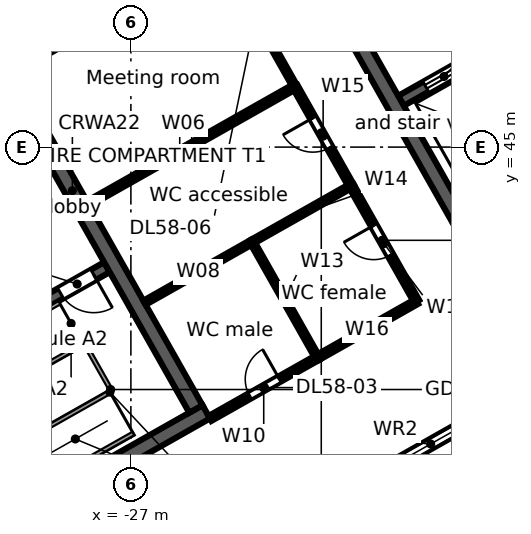
"""IFC4 building model, lengths in metres.
Left out: names, types, materials, properties, quantities, classifications, styles, units other than length and angle.
Written with IfcOpenShell. Run it as: python <this file> out.ifc"""

import sys

from ifc_helpers import new_model, si_unit, direction, frame, frame_2d, origin, place, context, subcontext, project, spatial, rectangle, extrude, element, fill, save


model = new_model("IFC4")
c1 = context("Model", 3, precision=1e-05, world=origin(), true_north=direction((0.0, 1.0)))
c2 = subcontext(c1, "Body", "Model", "MODEL_VIEW")
j1 = project(units=[si_unit("LENGTHUNIT", "METRE"), si_unit("PLANEANGLEUNIT", "RADIAN")], contexts=[c1])
p1 = place(None, origin())
s1 = spatial("IfcSite", under=j1, at=p1, CompositionType="ELEMENT")
p2 = place(p1, origin())
s2 = spatial("IfcBuilding", under=s1, at=p2, CompositionType="ELEMENT")
p3 = place(p2, frame((0.0, 0.0, 262.7)))
s3 = spatial("IfcBuildingStorey", under=s2, at=p3, CompositionType="ELEMENT", Elevation=262.7)
p4 = place(p3, frame((-58.732, 38.771, 0.0), z_axis=(0.0, 0.0, 1.0), x_axis=(0.870355615581, 0.492423702137, 0.0)))
e1 = element("IfcWall", 1, at=p4, inside=s3, PredefinedType="STANDARD", context=c2, shape_type="SweptSolid", body=[
    extrude(rectangle(XDim=64.052, YDim=0.25, at=frame_2d((32.026, 0.0))), origin(), (0.0, 0.0, 1.0), 3.52),
])
p5 = place(p4, frame((61.259, 0.0, 0.8)))
e2 = element("IfcOpeningElement", 2, at=p5, cuts=e1, PredefinedType="OPENING", context=c2, shape_type="SweptSolid", body=[
    extrude(rectangle(XDim=2.4, YDim=2.2, at=frame_2d((1.2, 1.1))), frame((0.0, 0.135, 0.0), z_axis=(0.0, -1.0, 0.0), x_axis=(1.0, 0.0, 0.0)), (0.0, 0.0, 1.0), 0.27),
])
p6 = place(p4, frame((58.216, 0.0, 0.8)))
e3 = element("IfcOpeningElement", 3, at=p6, cuts=e1, PredefinedType="OPENING", context=c2, shape_type="SweptSolid", body=[
    extrude(rectangle(XDim=2.4, YDim=2.2, at=frame_2d((1.2, 1.1))), frame((0.0, 0.135, 0.0), z_axis=(0.0, -1.0, 0.0), x_axis=(1.0, 0.0, 0.0)), (0.0, 0.0, 1.0), 0.27),
])
p7 = place(p4, frame((55.173, 0.0, 0.8)))
e4 = element("IfcOpeningElement", 4, at=p7, cuts=e1, PredefinedType="OPENING", context=c2, shape_type="SweptSolid", body=[
    extrude(rectangle(XDim=2.4, YDim=2.2, at=frame_2d((1.2, 1.1))), frame((0.0, 0.135, 0.0), z_axis=(0.0, -1.0, 0.0), x_axis=(1.0, 0.0, 0.0)), (0.0, 0.0, 1.0), 0.27),
])
p8 = place(p4, frame((52.129, 0.0, 0.8)))
e5 = element("IfcOpeningElement", 5, at=p8, cuts=e1, PredefinedType="OPENING", context=c2, shape_type="SweptSolid", body=[
    extrude(rectangle(XDim=2.4, YDim=2.2, at=frame_2d((1.2, 1.1))), frame((0.0, 0.135, 0.0), z_axis=(0.0, -1.0, 0.0), x_axis=(1.0, 0.0, 0.0)), (0.0, 0.0, 1.0), 0.27),
])
p9 = place(p4, frame((49.086, 0.0, 0.8)))
e6 = element("IfcOpeningElement", 6, at=p9, cuts=e1, PredefinedType="OPENING", context=c2, shape_type="SweptSolid", body=[
    extrude(rectangle(XDim=2.4, YDim=2.2, at=frame_2d((1.2, 1.1))), frame((0.0, 0.135, 0.0), z_axis=(0.0, -1.0, 0.0), x_axis=(1.0, 0.0, 0.0)), (0.0, 0.0, 1.0), 0.27),
])
p10 = place(p4, frame((46.043, 0.0, 0.8)))
e7 = element("IfcOpeningElement", 7, at=p10, cuts=e1, PredefinedType="OPENING", context=c2, shape_type="SweptSolid", body=[
    extrude(rectangle(XDim=2.4, YDim=2.2, at=frame_2d((1.2, 1.1))), frame((0.0, 0.135, 0.0), z_axis=(0.0, -1.0, 0.0), x_axis=(1.0, 0.0, 0.0)), (0.0, 0.0, 1.0), 0.27),
])
p11 = place(p4, frame((43.0, 0.0, 0.8)))
e8 = element("IfcOpeningElement", 8, at=p11, cuts=e1, PredefinedType="OPENING", context=c2, shape_type="SweptSolid", body=[
    extrude(rectangle(XDim=2.4, YDim=2.2, at=frame_2d((1.2, 1.1))), frame((0.0, 0.135, 0.0), z_axis=(0.0, -1.0, 0.0), x_axis=(1.0, 0.0, 0.0)), (0.0, 0.0, 1.0), 0.27),
])
p12 = place(p4, frame((39.956, 0.0, 0.8)))
e9 = element("IfcOpeningElement", 9, at=p12, cuts=e1, PredefinedType="OPENING", context=c2, shape_type="SweptSolid", body=[
    extrude(rectangle(XDim=2.4, YDim=2.2, at=frame_2d((1.2, 1.1))), frame((0.0, 0.135, 0.0), z_axis=(0.0, -1.0, 0.0), x_axis=(1.0, 0.0, 0.0)), (0.0, 0.0, 1.0), 0.27),
])
p13 = place(p4, frame((36.913, 0.0, 0.8)))
e10 = element("IfcOpeningElement", 10, at=p13, cuts=e1, PredefinedType="OPENING", context=c2, shape_type="SweptSolid", body=[
    extrude(rectangle(XDim=2.4, YDim=2.2, at=frame_2d((1.2, 1.1))), frame((0.0, 0.135, 0.0), z_axis=(0.0, -1.0, 0.0), x_axis=(1.0, 0.0, 0.0)), (0.0, 0.0, 1.0), 0.27),
])
p14 = place(p4, frame((33.87, 0.0, 0.8)))
e11 = element("IfcOpeningElement", 11, at=p14, cuts=e1, PredefinedType="OPENING", context=c2, shape_type="SweptSolid", body=[
    extrude(rectangle(XDim=2.4, YDim=2.2, at=frame_2d((1.2, 1.1))), frame((0.0, 0.135, 0.0), z_axis=(0.0, -1.0, 0.0), x_axis=(1.0, 0.0, 0.0)), (0.0, 0.0, 1.0), 0.27),
])
p15 = place(p4, frame((30.826, 0.0, 0.8)))
e12 = element("IfcOpeningElement", 12, at=p15, cuts=e1, PredefinedType="OPENING", context=c2, shape_type="SweptSolid", body=[
    extrude(rectangle(XDim=2.4, YDim=2.2, at=frame_2d((1.2, 1.1))), frame((0.0, 0.135, 0.0), z_axis=(0.0, -1.0, 0.0), x_axis=(1.0, 0.0, 0.0)), (0.0, 0.0, 1.0), 0.27),
])
p16 = place(p4, frame((27.783, 0.0, 0.8)))
e13 = element("IfcOpeningElement", 13, at=p16, cuts=e1, PredefinedType="OPENING", context=c2, shape_type="SweptSolid", body=[
    extrude(rectangle(XDim=2.4, YDim=2.2, at=frame_2d((1.2, 1.1))), frame((0.0, 0.135, 0.0), z_axis=(0.0, -1.0, 0.0), x_axis=(1.0, 0.0, 0.0)), (0.0, 0.0, 1.0), 0.27),
])
p17 = place(p4, frame((24.74, 0.0, 0.8)))
e14 = element("IfcOpeningElement", 14, at=p17, cuts=e1, PredefinedType="OPENING", context=c2, shape_type="SweptSolid", body=[
    extrude(rectangle(XDim=2.4, YDim=2.2, at=frame_2d((1.2, 1.1))), frame((0.0, 0.135, 0.0), z_axis=(0.0, -1.0, 0.0), x_axis=(1.0, 0.0, 0.0)), (0.0, 0.0, 1.0), 0.27),
])
p18 = place(p4, frame((21.696, 0.0, 0.8)))
e15 = element("IfcOpeningElement", 15, at=p18, cuts=e1, PredefinedType="OPENING", context=c2, shape_type="SweptSolid", body=[
    extrude(rectangle(XDim=2.4, YDim=2.2, at=frame_2d((1.2, 1.1))), frame((0.0, 0.135, 0.0), z_axis=(0.0, -1.0, 0.0), x_axis=(1.0, 0.0, 0.0)), (0.0, 0.0, 1.0), 0.27),
])
p19 = place(p4, frame((18.653, 0.0, 0.8)))
e16 = element("IfcOpeningElement", 16, at=p19, cuts=e1, PredefinedType="OPENING", context=c2, shape_type="SweptSolid", body=[
    extrude(rectangle(XDim=2.4, YDim=2.2, at=frame_2d((1.2, 1.1))), frame((0.0, 0.135, 0.0), z_axis=(0.0, -1.0, 0.0), x_axis=(1.0, 0.0, 0.0)), (0.0, 0.0, 1.0), 0.27),
])
p20 = place(p4, frame((15.61, 0.0, 0.8)))
e17 = element("IfcOpeningElement", 17, at=p20, cuts=e1, PredefinedType="OPENING", context=c2, shape_type="SweptSolid", body=[
    extrude(rectangle(XDim=2.4, YDim=2.2, at=frame_2d((1.2, 1.1))), frame((0.0, 0.135, 0.0), z_axis=(0.0, -1.0, 0.0), x_axis=(1.0, 0.0, 0.0)), (0.0, 0.0, 1.0), 0.27),
])
p21 = place(p4, frame((12.567, 0.0, 0.8)))
e18 = element("IfcOpeningElement", 18, at=p21, cuts=e1, PredefinedType="OPENING", context=c2, shape_type="SweptSolid", body=[
    extrude(rectangle(XDim=2.4, YDim=2.2, at=frame_2d((1.2, 1.1))), frame((0.0, 0.135, 0.0), z_axis=(0.0, -1.0, 0.0), x_axis=(1.0, 0.0, 0.0)), (0.0, 0.0, 1.0), 0.27),
])
p22 = place(p4, frame((9.523, 0.0, 0.8)))
e19 = element("IfcOpeningElement", 19, at=p22, cuts=e1, PredefinedType="OPENING", context=c2, shape_type="SweptSolid", body=[
    extrude(rectangle(XDim=2.4, YDim=2.2, at=frame_2d((1.2, 1.1))), frame((0.0, 0.135, 0.0), z_axis=(0.0, -1.0, 0.0), x_axis=(1.0, 0.0, 0.0)), (0.0, 0.0, 1.0), 0.27),
])
p23 = place(p4, frame((6.48, 0.0, 0.8)))
e20 = element("IfcOpeningElement", 20, at=p23, cuts=e1, PredefinedType="OPENING", context=c2, shape_type="SweptSolid", body=[
    extrude(rectangle(XDim=2.4, YDim=2.2, at=frame_2d((1.2, 1.1))), frame((0.0, 0.135, 0.0), z_axis=(0.0, -1.0, 0.0), x_axis=(1.0, 0.0, 0.0)), (0.0, 0.0, 1.0), 0.27),
])
p24 = place(p4, frame((3.437, 0.0, 0.8)))
e21 = element("IfcOpeningElement", 21, at=p24, cuts=e1, PredefinedType="OPENING", context=c2, shape_type="SweptSolid", body=[
    extrude(rectangle(XDim=2.4, YDim=2.2, at=frame_2d((1.2, 1.1))), frame((0.0, 0.135, 0.0), z_axis=(0.0, -1.0, 0.0), x_axis=(1.0, 0.0, 0.0)), (0.0, 0.0, 1.0), 0.27),
])
p25 = place(p4, frame((0.393, 0.0, 0.8)))
e22 = element("IfcOpeningElement", 22, at=p25, cuts=e1, PredefinedType="OPENING", context=c2, shape_type="SweptSolid", body=[
    extrude(rectangle(XDim=2.4, YDim=2.2, at=frame_2d((1.2, 1.1))), frame((0.0, 0.135, 0.0), z_axis=(0.0, -1.0, 0.0), x_axis=(1.0, 0.0, 0.0)), (0.0, 0.0, 1.0), 0.27),
])
p26 = place(p3, frame((-3.017, 46.293, 0.0), z_axis=(0.0, 0.0, 1.0), x_axis=(-0.870355474887, -0.492423950812, 0.0)))
e23 = element("IfcWall", 23, at=p26, inside=s3, PredefinedType="STANDARD", context=c2, shape_type="SweptSolid", body=[
    extrude(rectangle(XDim=40.34, YDim=0.25, at=frame_2d((20.17, 0.0))), origin(), (0.0, 0.0, 1.0), 3.52),
])
p27 = place(p26, frame((37.428, 0.0, 0.8)))
e24 = element("IfcOpeningElement", 24, at=p27, cuts=e23, PredefinedType="OPENING", context=c2, shape_type="SweptSolid", body=[
    extrude(rectangle(XDim=2.4, YDim=2.2, at=frame_2d((1.2, 1.1))), frame((0.0, 0.135, 0.0), z_axis=(0.0, -1.0, 0.0), x_axis=(1.0, 0.0, 0.0)), (0.0, 0.0, 1.0), 0.27),
])
p28 = place(p26, frame((34.372, 0.0, 0.0)))
e25 = element("IfcOpeningElement", 25, at=p28, cuts=e23, PredefinedType="OPENING", context=c2, shape_type="SweptSolid", body=[
    extrude(rectangle(XDim=1.8, YDim=2.4, at=frame_2d((0.9, 1.2))), frame((0.0, 0.135, 0.0), z_axis=(0.0, -1.0, 0.0), x_axis=(1.0, 0.0, 0.0)), (0.0, 0.0, 1.0), 0.27),
])
p29 = place(p26, frame((30.716, 0.0, 0.8)))
e26 = element("IfcOpeningElement", 26, at=p29, cuts=e23, PredefinedType="OPENING", context=c2, shape_type="SweptSolid", body=[
    extrude(rectangle(XDim=2.4, YDim=2.2, at=frame_2d((1.2, 1.1))), frame((0.0, 0.135, 0.0), z_axis=(0.0, -1.0, 0.0), x_axis=(1.0, 0.0, 0.0)), (0.0, 0.0, 1.0), 0.27),
])
p30 = place(p26, frame((27.36, 0.0, 0.8)))
e27 = element("IfcOpeningElement", 27, at=p30, cuts=e23, PredefinedType="OPENING", context=c2, shape_type="SweptSolid", body=[
    extrude(rectangle(XDim=2.4, YDim=2.2, at=frame_2d((1.2, 1.1))), frame((0.0, 0.135, 0.0), z_axis=(0.0, -1.0, 0.0), x_axis=(1.0, 0.0, 0.0)), (0.0, 0.0, 1.0), 0.27),
])
p31 = place(p26, frame((24.304, 0.0, 0.0)))
e28 = element("IfcOpeningElement", 28, at=p31, cuts=e23, PredefinedType="OPENING", context=c2, shape_type="SweptSolid", body=[
    extrude(rectangle(XDim=1.8, YDim=2.4, at=frame_2d((0.9, 1.2))), frame((0.0, 0.135, 0.0), z_axis=(0.0, -1.0, 0.0), x_axis=(1.0, 0.0, 0.0)), (0.0, 0.0, 1.0), 0.27),
])
p32 = place(p26, frame((20.648, 0.0, 0.8)))
e29 = element("IfcOpeningElement", 29, at=p32, cuts=e23, PredefinedType="OPENING", context=c2, shape_type="SweptSolid", body=[
    extrude(rectangle(XDim=2.4, YDim=2.2, at=frame_2d((1.2, 1.1))), frame((0.0, 0.135, 0.0), z_axis=(0.0, -1.0, 0.0), x_axis=(1.0, 0.0, 0.0)), (0.0, 0.0, 1.0), 0.27),
])
p33 = place(p26, frame((17.292, 0.0, 0.8)))
e30 = element("IfcOpeningElement", 30, at=p33, cuts=e23, PredefinedType="OPENING", context=c2, shape_type="SweptSolid", body=[
    extrude(rectangle(XDim=2.4, YDim=2.2, at=frame_2d((1.2, 1.1))), frame((0.0, 0.135, 0.0), z_axis=(0.0, -1.0, 0.0), x_axis=(1.0, 0.0, 0.0)), (0.0, 0.0, 1.0), 0.27),
])
p34 = place(p26, frame((14.236, 0.0, 0.0)))
e31 = element("IfcOpeningElement", 31, at=p34, cuts=e23, PredefinedType="OPENING", context=c2, shape_type="SweptSolid", body=[
    extrude(rectangle(XDim=1.8, YDim=2.4, at=frame_2d((0.9, 1.2))), frame((0.0, 0.135, 0.0), z_axis=(0.0, -1.0, 0.0), x_axis=(1.0, 0.0, 0.0)), (0.0, 0.0, 1.0), 0.27),
])
p35 = place(p26, frame((10.58, 0.0, 0.8)))
e32 = element("IfcOpeningElement", 32, at=p35, cuts=e23, PredefinedType="OPENING", context=c2, shape_type="SweptSolid", body=[
    extrude(rectangle(XDim=2.4, YDim=2.2, at=frame_2d((1.2, 1.1))), frame((0.0, 0.135, 0.0), z_axis=(0.0, -1.0, 0.0), x_axis=(1.0, 0.0, 0.0)), (0.0, 0.0, 1.0), 0.27),
])
p36 = place(p26, frame((7.224, 0.0, 0.8)))
e33 = element("IfcOpeningElement", 33, at=p36, cuts=e23, PredefinedType="OPENING", context=c2, shape_type="SweptSolid", body=[
    extrude(rectangle(XDim=2.4, YDim=2.2, at=frame_2d((1.2, 1.1))), frame((0.0, 0.135, 0.0), z_axis=(0.0, -1.0, 0.0), x_axis=(1.0, 0.0, 0.0)), (0.0, 0.0, 1.0), 0.27),
])
p37 = place(p26, frame((4.168, 0.0, 0.0)))
e34 = element("IfcOpeningElement", 34, at=p37, cuts=e23, PredefinedType="OPENING", context=c2, shape_type="SweptSolid", body=[
    extrude(rectangle(XDim=1.8, YDim=2.4, at=frame_2d((0.9, 1.2))), frame((0.0, 0.135, 0.0), z_axis=(0.0, -1.0, 0.0), x_axis=(1.0, 0.0, 0.0)), (0.0, 0.0, 1.0), 0.27),
])
p38 = place(p26, frame((0.512, 0.0, 0.8)))
e35 = element("IfcOpeningElement", 35, at=p38, cuts=e23, PredefinedType="OPENING", context=c2, shape_type="SweptSolid", body=[
    extrude(rectangle(XDim=2.4, YDim=2.2, at=frame_2d((1.2, 1.1))), frame((0.0, 0.135, 0.0), z_axis=(0.0, -1.0, 0.0), x_axis=(1.0, 0.0, 0.0)), (0.0, 0.0, 1.0), 0.27),
])
p39 = place(p3, frame((-39.813, 29.662, 0.0), z_axis=(0.0, 0.0, 1.0), x_axis=(0.870350116061, 0.492433422375, 0.0)))
e36 = element("IfcWall", 36, at=p39, inside=s3, PredefinedType="SOLIDWALL", context=c2, shape_type="SweptSolid", body=[
    extrude(rectangle(XDim=17.0, YDim=0.4, at=frame_2d((8.5, 0.0))), origin(), (0.0, 0.0, 1.0), 3.52),
])
p40 = place(p39, frame((7.2, 0.0, 0.0)))
e37 = element("IfcOpeningElement", 37, at=p40, cuts=e36, PredefinedType="OPENING", context=c2, shape_type="SweptSolid", body=[
    extrude(rectangle(XDim=1.2, YDim=2.1, at=frame_2d((0.6, 1.05))), frame((0.0, 0.21, 0.0), z_axis=(0.0, -1.0, 0.0), x_axis=(1.0, 0.0, 0.0)), (0.0, 0.0, 1.0), 0.42),
])
p41 = place(p3, frame((-34.245, 38.097, 0.0), z_axis=(0.0, 0.0, 1.0), x_axis=(0.870356351998, 0.492422400523, 0.0)))
e38 = element("IfcWall", 38, at=p41, inside=s3, PredefinedType="SOLIDWALL", context=c2, shape_type="SweptSolid", body=[
    extrude(rectangle(XDim=7.6, YDim=0.3, at=frame_2d((3.8, 0.0))), origin(), (0.0, 0.0, 1.0), 3.52),
])
p42 = place(p41, frame((6.2, 0.0, 0.0)))
e39 = element("IfcOpeningElement", 39, at=p42, cuts=e38, PredefinedType="OPENING", context=c2, shape_type="SweptSolid", body=[
    extrude(rectangle(XDim=1.0, YDim=2.1, at=frame_2d((0.5, 1.05))), frame((0.0, 0.16, 0.0), z_axis=(0.0, -1.0, 0.0), x_axis=(1.0, 0.0, 0.0)), (0.0, 0.0, 1.0), 0.32),
])
p43 = place(p3, frame((-31.79, 49.597, 0.0), z_axis=(0.0, 0.0, 1.0), x_axis=(0.492421663121, -0.870356769198, 0.0)))
e40 = element("IfcWall", 40, at=p43, inside=s3, PredefinedType="SOLIDWALL", context=c2, shape_type="SweptSolid", body=[
    extrude(rectangle(XDim=13.2, YDim=0.4, at=frame_2d((6.6, 0.0))), origin(), (0.0, 0.0, 1.0), 3.52),
])
p44 = place(p3, frame((-19.892, 46.218, 0.0), z_axis=(0.0, 0.0, 1.0), x_axis=(0.870341639186, 0.492448404505, 0.0)))
e41 = element("IfcWall", 41, at=p44, inside=s3, PredefinedType="SOLIDWALL", context=c2, shape_type="SweptSolid", body=[
    extrude(rectangle(XDim=5.1, YDim=0.3, at=frame_2d((2.55, 0.0))), origin(), (0.0, 0.0, 1.0), 3.52),
])
p45 = place(p44, frame((0.75, 0.0, 0.0)))
e42 = element("IfcOpeningElement", 42, at=p45, cuts=e41, PredefinedType="OPENING", context=c2, shape_type="SweptSolid", body=[
    extrude(rectangle(XDim=1.1, YDim=2.1, at=frame_2d((0.55, 1.05))), frame((0.0, 0.16, 0.0), z_axis=(0.0, -1.0, 0.0), x_axis=(1.0, 0.0, 0.0)), (0.0, 0.0, 1.0), 0.32),
])
p46 = place(p44, frame((3.35, 0.0, 0.0)))
e43 = element("IfcOpeningElement", 43, at=p46, cuts=e41, PredefinedType="OPENING", context=c2, shape_type="SweptSolid", body=[
    extrude(rectangle(XDim=1.1, YDim=2.1, at=frame_2d((0.55, 1.05))), frame((0.0, 0.16, 0.0), z_axis=(0.0, -1.0, 0.0), x_axis=(1.0, 0.0, 0.0)), (0.0, 0.0, 1.0), 0.32),
])
p47 = place(p3, frame((-24.4, 53.779, 0.0), z_axis=(0.0, 0.0, 1.0), x_axis=(0.492421663121, -0.870356769198, 0.0)))
e44 = element("IfcWall", 44, at=p47, inside=s3, PredefinedType="SOLIDWALL", context=c2, shape_type="SweptSolid", body=[
    extrude(rectangle(XDim=13.2, YDim=0.4, at=frame_2d((6.6, 0.0))), origin(), (0.0, 0.0, 1.0), 3.52),
])
p48 = place(p3, frame((-30.089, 46.998, 0.0), z_axis=(0.0, 0.0, 1.0), x_axis=(0.870424575418, 0.492301796167, 0.0)))
e45 = element("IfcWall", 45, at=p48, inside=s3, PredefinedType="PARTITIONING", context=c2, shape_type="SweptSolid", body=[
    extrude(rectangle(XDim=6.25, YDim=0.125, at=frame_2d((3.125, 0.0))), origin(), (0.0, 0.0, 1.0), 3.52),
])
p49 = place(p3, frame((-28.119, 43.516, 0.0), z_axis=(0.0, 0.0, 1.0), x_axis=(0.870310250913, 0.49250387527, 0.0)))
e46 = element("IfcWall", 46, at=p49, inside=s3, PredefinedType="PARTITIONING", context=c2, shape_type="SweptSolid", body=[
    extrude(rectangle(XDim=6.25, YDim=0.15, at=frame_2d((3.125, 0.0))), origin(), (0.0, 0.0, 1.0), 2.792),
])
p50 = place(p3, frame((-26.642, 40.905, 0.0), z_axis=(0.0, 0.0, 1.0), x_axis=(0.870296945076, 0.492527387453, 0.0)))
e47 = element("IfcWall", 47, at=p50, inside=s3, PredefinedType="PARTITIONING", context=c2, shape_type="SweptSolid", body=[
    extrude(rectangle(XDim=3.251, YDim=0.125, at=frame_2d((1.625, 0.0))), origin(), (0.0, 0.0, 1.0), 2.792),
])
p51 = place(p3, frame((-24.919, 37.859, 0.0), z_axis=(0.0, 0.0, 1.0), x_axis=(0.870407498556, 0.49233198805, 0.0)))
e48 = element("IfcWall", 48, at=p51, inside=s3, PredefinedType="PARTITIONING", context=c2, shape_type="SweptSolid", body=[
    extrude(rectangle(XDim=3.25, YDim=0.15, at=frame_2d((1.625, 0.0))), origin(), (0.0, 0.0, 1.0), 2.792),
])
p52 = place(p51, frame((1.2, 0.0, 0.0)))
e49 = element("IfcOpeningElement", 49, at=p52, cuts=e48, PredefinedType="OPENING", context=c2, shape_type="SweptSolid", body=[
    extrude(rectangle(XDim=0.9, YDim=2.1, at=frame_2d((0.45, 1.05))), frame((0.0, 0.085, 0.0), z_axis=(0.0, -1.0, 0.0), x_axis=(1.0, 0.0, 0.0)), (0.0, 0.0, 1.0), 0.17),
])
p53 = place(p3, frame((-24.649, 50.075, 0.0), z_axis=(0.0, 0.0, 1.0), x_axis=(0.492340861121, -0.870402479587, 0.0)))
e50 = element("IfcWall", 50, at=p53, inside=s3, PredefinedType="PARTITIONING", context=c2, shape_type="SweptSolid", body=[
    extrude(rectangle(XDim=3.999, YDim=0.125, at=frame_2d((2.0, 0.0))), origin(), (0.0, 0.0, 1.0), 2.792),
])
p54 = place(p53, frame((1.45, 0.0, 0.0)))
e51 = element("IfcOpeningElement", 51, at=p54, cuts=e50, PredefinedType="OPENING", context=c2, shape_type="SweptSolid", body=[
    extrude(rectangle(XDim=0.9, YDim=2.1, at=frame_2d((0.45, 1.05))), frame((0.0, 0.073, 0.0), z_axis=(0.0, -1.0, 0.0), x_axis=(1.0, 0.0, 0.0)), (0.0, 0.0, 1.0), 0.145),
])
p55 = place(p3, frame((-23.813, 42.506, 0.0), z_axis=(0.0, 0.0, 1.0), x_axis=(0.492190545807, -0.870487487916, 0.0)))
e52 = element("IfcWall", 52, at=p55, inside=s3, PredefinedType="PARTITIONING", context=c2, shape_type="SweptSolid", body=[
    extrude(rectangle(XDim=3.5, YDim=0.125, at=frame_2d((1.75, 0.0))), origin(), (0.0, 0.0, 1.0), 3.52),
])
p56 = place(p3, frame((-23.813, 42.506, 0.0), z_axis=(0.0, 0.0, 1.0), x_axis=(0.870423351516, 0.492303960105, 0.0)))
e53 = element("IfcWall", 53, at=p56, inside=s3, PredefinedType="PARTITIONING", context=c2, shape_type="SweptSolid", body=[
    extrude(rectangle(XDim=3.0, YDim=0.125, at=frame_2d((1.5, 0.0))), origin(), (0.0, 0.0, 1.0), 3.52),
])
p57 = place(p3, frame((-22.68, 46.594, 0.0), z_axis=(0.0, 0.0, 1.0), x_axis=(0.492612172641, -0.870248957119, 0.0)))
e54 = element("IfcWall", 54, at=p57, inside=s3, PredefinedType="PARTITIONING", context=c2, shape_type="SweptSolid", body=[
    extrude(rectangle(XDim=3.0, YDim=0.15, at=frame_2d((1.5, 0.0))), origin(), (0.0, 0.0, 1.0), 3.52),
])
p58 = place(p57, frame((0.95, 0.0, 0.0)))
e55 = element("IfcOpeningElement", 55, at=p58, cuts=e54, PredefinedType="OPENING", context=c2, shape_type="SweptSolid", body=[
    extrude(rectangle(XDim=0.9, YDim=2.1, at=frame_2d((0.45, 1.05))), frame((0.0, 0.085, 0.0), z_axis=(0.0, -1.0, 0.0), x_axis=(1.0, 0.0, 0.0)), (0.0, 0.0, 1.0), 0.17),
])
p59 = place(p3, frame((-22.09, 39.459, 0.0), z_axis=(0.0, 0.0, 1.0), x_axis=(0.870248957119, 0.492612172641, 0.0)))
e56 = element("IfcWall", 56, at=p59, inside=s3, PredefinedType="PARTITIONING", context=c2, shape_type="SweptSolid", body=[
    extrude(rectangle(XDim=3.0, YDim=0.15, at=frame_2d((1.5, 0.0))), origin(), (0.0, 0.0, 1.0), 3.52),
])
p60 = place(p3, frame((-21.202, 43.983, 0.0), z_axis=(0.0, 0.0, 1.0), x_axis=(0.492339993675, -0.870402970255, 0.0)))
e57 = element("IfcWall", 57, at=p60, inside=s3, PredefinedType="PARTITIONING", context=c2, shape_type="SweptSolid", body=[
    extrude(rectangle(XDim=3.5, YDim=0.15, at=frame_2d((1.75, 0.0))), origin(), (0.0, 0.0, 1.0), 3.52),
])
p61 = place(p60, frame((1.2, 0.0, 0.0)))
e58 = element("IfcOpeningElement", 58, at=p61, cuts=e57, PredefinedType="OPENING", context=c2, shape_type="SweptSolid", body=[
    extrude(rectangle(XDim=0.9, YDim=2.1, at=frame_2d((0.45, 1.05))), frame((0.0, 0.085, 0.0), z_axis=(0.0, -1.0, 0.0), x_axis=(1.0, 0.0, 0.0)), (0.0, 0.0, 1.0), 0.17),
])
p62 = place(p33, origin())
e59 = element("IfcWindow", 59, at=p62, inside=s3, PartitioningType="SINGLE_PANEL", PredefinedType="WINDOW", context=c2, shape_type="SweptSolid", body=[
    extrude(rectangle(XDim=2.4, YDim=2.2, at=frame_2d((1.2, 1.1))), frame((0.0, 0.03, 0.0), z_axis=(0.0, -1.0, 0.0), x_axis=(1.0, 0.0, 0.0)), (0.0, 0.0, 1.0), 0.06),
])
fill(e30, e59)
p63 = place(p42, frame((1.0, 0.0, 0.0), z_axis=(0.0, 0.0, 1.0), x_axis=(-1.0, 0.0, 0.0)))
e60 = element("IfcDoor", 60, at=p63, inside=s3, OperationType="SINGLE_SWING_LEFT", PredefinedType="DOOR", context=c2, shape_type="SweptSolid", body=[
    extrude(rectangle(XDim=1.0, YDim=2.1, at=frame_2d((0.5, 1.05))), frame((0.0, 0.025, 0.0), z_axis=(0.0, -1.0, 0.0), x_axis=(1.0, 0.0, 0.0)), (0.0, 0.0, 1.0), 0.05),
])
fill(e39, e60)
p64 = place(p45, origin())
e61 = element("IfcDoor", 61, at=p64, inside=s3, OperationType="DOUBLE_DOOR_SLIDING", PredefinedType="DOOR", context=c2, shape_type="SweptSolid", body=[
    extrude(rectangle(XDim=1.1, YDim=2.1, at=frame_2d((0.55, 1.05))), frame((0.0, 0.025, 0.0), z_axis=(0.0, -1.0, 0.0), x_axis=(1.0, 0.0, 0.0)), (0.0, 0.0, 1.0), 0.05),
])
fill(e42, e61)
p65 = place(p52, origin())
e62 = element("IfcDoor", 62, at=p65, inside=s3, OperationType="SINGLE_SWING_RIGHT", PredefinedType="DOOR", context=c2, shape_type="SweptSolid", body=[
    extrude(rectangle(XDim=0.9, YDim=2.1, at=frame_2d((0.45, 1.05))), frame((0.0, 0.025, 0.0), z_axis=(0.0, -1.0, 0.0), x_axis=(1.0, 0.0, 0.0)), (0.0, 0.0, 1.0), 0.05),
])
fill(e49, e62)
p66 = place(p61, frame((0.9, 0.0, 0.0), z_axis=(0.0, 0.0, 1.0), x_axis=(-1.0, 0.0, 0.0)))
e63 = element("IfcDoor", 63, at=p66, inside=s3, OperationType="SINGLE_SWING_RIGHT", PredefinedType="DOOR", context=c2, shape_type="SweptSolid", body=[
    extrude(rectangle(XDim=0.9, YDim=2.1, at=frame_2d((0.45, 1.05))), frame((0.0, 0.025, 0.0), z_axis=(0.0, -1.0, 0.0), x_axis=(1.0, 0.0, 0.0)), (0.0, 0.0, 1.0), 0.05),
])
fill(e58, e63)
p67 = place(p58, frame((0.9, 0.0, 0.0), z_axis=(0.0, 0.0, 1.0), x_axis=(-1.0, 0.0, 0.0)))
e64 = element("IfcDoor", 64, at=p67, inside=s3, OperationType="SINGLE_SWING_RIGHT", PredefinedType="DOOR", context=c2, shape_type="SweptSolid", body=[
    extrude(rectangle(XDim=0.9, YDim=2.1, at=frame_2d((0.45, 1.05))), frame((0.0, 0.025, 0.0), z_axis=(0.0, -1.0, 0.0), x_axis=(1.0, 0.0, 0.0)), (0.0, 0.0, 1.0), 0.05),
])
fill(e55, e64)
save(model, sys.argv[1])
